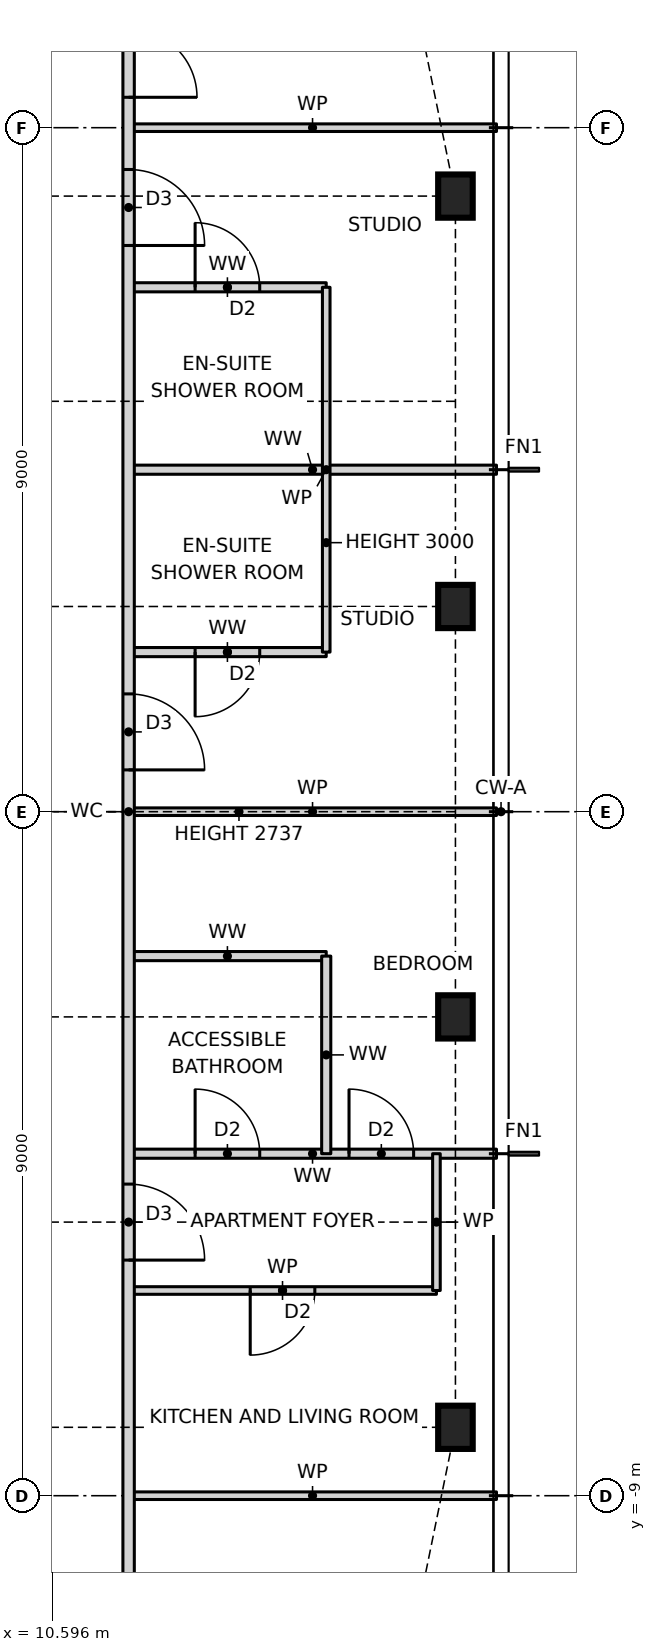
"""IFC4 building model, lengths in metres.
Left out: names, types, materials, properties, quantities, classifications, styles, units other than length and angle.
Written with IfcOpenShell. Run it as: python <this file> out.ifc"""

import sys

from ifc_helpers import new_model, si_unit, direction, frame, frame_2d, origin, origin_2d, place, context, subcontext, project, spatial, rectangle, i_section, extrude, element, fill, save


model = new_model("IFC4")
c1 = context("Model", 3, precision=1e-05, world=origin(), true_north=direction((0.0, 1.0)))
c2 = subcontext(c1, "Body", "Model", "MODEL_VIEW")
j1 = project(units=[si_unit("LENGTHUNIT", "METRE"), si_unit("PLANEANGLEUNIT", "RADIAN")], contexts=[c1])
p1 = place(None, origin())
s1 = spatial("IfcSite", under=j1, at=p1, CompositionType="ELEMENT")
p2 = place(p1, origin())
s2 = spatial("IfcBuilding", under=s1, at=p2, CompositionType="ELEMENT")
p3 = place(p2, frame((0.0, 0.0, 222.0)))
s3 = spatial("IfcBuildingStorey", under=s2, at=p3, CompositionType="ELEMENT", Elevation=222.0)
for number, where, z_axis, x_axis in (
    (1, (15.9, -8.1, 0.0), (0.0, 0.0, 1.0), (1.0, 0.0, 0.0)),
    (2, (15.9, -2.7, 0.0), (0.0, 0.0, 1.0), (1.0, 0.0, 0.0)),
    (3, (15.9, 2.7, 0.0), (0.0, 0.0, 1.0), (1.0, 0.0, 0.0)),
    (4, (15.9, 8.1, 0.0), (0.0, 0.0, 1.0), (1.0, 0.0, 0.0)),
):
    element("IfcColumn", number, at=place(p3, frame(where, z_axis=z_axis, x_axis=x_axis)), inside=s3, PredefinedType="COLUMN", context=c2, shape_type="SweptSolid", body=[
        extrude(i_section(OverallWidth=0.455, OverallDepth=0.569, WebThickness=0.078, FlangeThickness=0.125, at=origin_2d()), origin(), (0.0, 0.0, 1.0), 3.5),
    ])
p4 = place(p3, frame((11.6, -9.0, 0.0), z_axis=(0.0, 0.0, 1.0), x_axis=(1.0, 0.0, 0.0)))
e5 = element("IfcWall", 5, at=p4, inside=s3, PredefinedType="PARTITIONING", context=c2, shape_type="SweptSolid", body=[
    extrude(rectangle(XDim=4.84, YDim=0.1, at=frame_2d((2.42, 0.0))), origin(), (0.0, 0.0, 1.0), 3.27),
])
p5 = place(p3, frame((11.6, -6.3, 0.0), z_axis=(0.0, 0.0, 1.0), x_axis=(1.0, 0.0, 0.0)))
e6 = element("IfcWall", 6, at=p5, inside=s3, PredefinedType="PARTITIONING", context=c2, shape_type="SweptSolid", body=[
    extrude(rectangle(XDim=4.05, YDim=0.1, at=frame_2d((2.025, 0.0))), origin(), (0.0, 0.0, 1.0), 3.27),
])
p6 = place(p5, frame((1.6, 0.0, 0.0)))
e7 = element("IfcOpeningElement", 7, at=p6, cuts=e6, PredefinedType="OPENING", context=c2, shape_type="SweptSolid", body=[
    extrude(rectangle(XDim=0.85, YDim=2.1, at=frame_2d((0.425, 1.05))), frame((0.0, 0.06, 0.0), z_axis=(0.0, -1.0, 0.0), x_axis=(1.0, 0.0, 0.0)), (0.0, 0.0, 1.0), 0.12),
])
p7 = place(p3, frame((11.6, -4.5, 0.0), z_axis=(0.0, 0.0, 1.0), x_axis=(1.0, 0.0, 0.0)))
e8 = element("IfcWall", 8, at=p7, inside=s3, PredefinedType="PARTITIONING", context=c2, shape_type="SweptSolid", body=[
    extrude(rectangle(XDim=4.84, YDim=0.12, at=frame_2d((2.42, 0.0))), origin(), (0.0, 0.0, 1.0), 3.27),
])
p8 = place(p7, frame((2.9, 0.0, 0.0)))
e9 = element("IfcOpeningElement", 9, at=p8, cuts=e8, PredefinedType="OPENING", context=c2, shape_type="SweptSolid", body=[
    extrude(rectangle(XDim=0.85, YDim=2.1, at=frame_2d((0.425, 1.05))), frame((0.0, 0.07, 0.0), z_axis=(0.0, -1.0, 0.0), x_axis=(1.0, 0.0, 0.0)), (0.0, 0.0, 1.0), 0.14),
])
p9 = place(p7, frame((0.875, 0.0, 0.0)))
e10 = element("IfcOpeningElement", 10, at=p9, cuts=e8, PredefinedType="OPENING", context=c2, shape_type="SweptSolid", body=[
    extrude(rectangle(XDim=0.85, YDim=2.1, at=frame_2d((0.425, 1.05))), frame((0.0, 0.07, 0.0), z_axis=(0.0, -1.0, 0.0), x_axis=(1.0, 0.0, 0.0)), (0.0, 0.0, 1.0), 0.14),
])
p10 = place(p3, frame((11.6, -1.9, 0.0), z_axis=(0.0, 0.0, 1.0), x_axis=(1.0, 0.0, 0.0)))
e11 = element("IfcWall", 11, at=p10, inside=s3, PredefinedType="PARTITIONING", context=c2, shape_type="SweptSolid", body=[
    extrude(rectangle(XDim=2.6, YDim=0.12, at=frame_2d((1.3, 0.0))), origin(), (0.0, 0.0, 1.0), 3.27),
])
p11 = place(p3, frame((11.6, 0.0, 0.0), z_axis=(0.0, 0.0, 1.0), x_axis=(1.0, 0.0, 0.0)))
e12 = element("IfcWall", 12, at=p11, inside=s3, PredefinedType="PARTITIONING", context=c2, shape_type="SweptSolid", body=[
    extrude(rectangle(XDim=4.84, YDim=0.1, at=frame_2d((2.42, 0.0))), origin(), (0.0, 0.0, 1.0), 2.737),
])
p12 = place(p3, frame((11.6, 2.1, 0.0), z_axis=(0.0, 0.0, 1.0), x_axis=(1.0, 0.0, 0.0)))
e13 = element("IfcWall", 13, at=p12, inside=s3, PredefinedType="PARTITIONING", context=c2, shape_type="SweptSolid", body=[
    extrude(rectangle(XDim=2.6, YDim=0.12, at=frame_2d((1.3, 0.0))), origin(), (0.0, 0.0, 1.0), 3.27),
])
p13 = place(p12, frame((0.875, 0.0, 0.0)))
e14 = element("IfcOpeningElement", 14, at=p13, cuts=e13, PredefinedType="OPENING", context=c2, shape_type="SweptSolid", body=[
    extrude(rectangle(XDim=0.85, YDim=2.1, at=frame_2d((0.425, 1.05))), frame((0.0, 0.07, 0.0), z_axis=(0.0, -1.0, 0.0), x_axis=(1.0, 0.0, 0.0)), (0.0, 0.0, 1.0), 0.14),
])
p14 = place(p3, frame((11.6, 4.5, 0.0), z_axis=(0.0, 0.0, 1.0), x_axis=(1.0, 0.0, 0.0)))
e15 = element("IfcWall", 15, at=p14, inside=s3, PredefinedType="PARTITIONING", context=c2, shape_type="SweptSolid", body=[
    extrude(rectangle(XDim=4.84, YDim=0.12, at=frame_2d((2.42, 0.0))), origin(), (0.0, 0.0, 1.0), 3.27),
])
p15 = place(p3, frame((11.6, 6.9, 0.0), z_axis=(0.0, 0.0, 1.0), x_axis=(1.0, 0.0, 0.0)))
e16 = element("IfcWall", 16, at=p15, inside=s3, PredefinedType="PARTITIONING", context=c2, shape_type="SweptSolid", body=[
    extrude(rectangle(XDim=2.6, YDim=0.12, at=frame_2d((1.3, 0.0))), origin(), (0.0, 0.0, 1.0), 3.27),
])
p16 = place(p15, frame((0.875, 0.0, 0.0)))
e17 = element("IfcOpeningElement", 17, at=p16, cuts=e16, PredefinedType="OPENING", context=c2, shape_type="SweptSolid", body=[
    extrude(rectangle(XDim=0.85, YDim=2.1, at=frame_2d((0.425, 1.05))), frame((0.0, 0.07, 0.0), z_axis=(0.0, -1.0, 0.0), x_axis=(1.0, 0.0, 0.0)), (0.0, 0.0, 1.0), 0.14),
])
p17 = place(p3, frame((11.6, 9.0, 0.0), z_axis=(0.0, 0.0, 1.0), x_axis=(1.0, 0.0, 0.0)))
e18 = element("IfcWall", 18, at=p17, inside=s3, PredefinedType="PARTITIONING", context=c2, shape_type="SweptSolid", body=[
    extrude(rectangle(XDim=4.84, YDim=0.1, at=frame_2d((2.42, 0.0))), origin(), (0.0, 0.0, 1.0), 3.27),
])
p18 = place(p3, frame((15.65, -6.3, 0.0), z_axis=(0.0, 0.0, 1.0), x_axis=(0.0, 1.0, 0.0)))
e19 = element("IfcWall", 19, at=p18, inside=s3, PredefinedType="PARTITIONING", context=c2, shape_type="SweptSolid", body=[
    extrude(rectangle(XDim=1.8, YDim=0.1, at=frame_2d((0.9, 0.0))), origin(), (0.0, 0.0, 1.0), 3.27),
])
p19 = place(p3, frame((14.2, -4.5, 0.0), z_axis=(0.0, 0.0, 1.0), x_axis=(0.0, 1.0, 0.0)))
e20 = element("IfcWall", 20, at=p19, inside=s3, PredefinedType="PARTITIONING", context=c2, shape_type="SweptSolid", body=[
    extrude(rectangle(XDim=2.6, YDim=0.12, at=frame_2d((1.3, 0.0))), origin(), (0.0, 0.0, 1.0), 3.27),
])
p20 = place(p3, frame((14.2, 2.1, 0.0), z_axis=(0.0, 0.0, 1.0), x_axis=(0.0, 1.0, 0.0)))
e21 = element("IfcWall", 21, at=p20, inside=s3, PredefinedType="PARTITIONING", context=c2, shape_type="SweptSolid", body=[
    extrude(rectangle(XDim=4.8, YDim=0.1, at=frame_2d((2.4, 0.0))), origin(), (0.0, 0.0, 1.0), 3.0),
])
p21 = place(p3, frame((11.6, -11.6, 0.0), z_axis=(0.0, 0.0, 1.0), x_axis=(0.0, 1.0, 0.0)))
e22 = element("IfcWall", 22, at=p21, inside=s3, PredefinedType="PARTITIONING", context=c2, shape_type="SweptSolid", body=[
    extrude(rectangle(XDim=23.2, YDim=0.15, at=frame_2d((11.6, 0.0))), origin(), (0.0, 0.0, 1.0), 3.27),
])
p22 = place(p21, frame((5.7, 0.0, 0.0)))
e23 = element("IfcOpeningElement", 23, at=p22, cuts=e22, PredefinedType="OPENING", context=c2, shape_type="SweptSolid", body=[
    extrude(rectangle(XDim=1.0, YDim=2.1, at=frame_2d((0.5, 1.05))), frame((0.0, 0.085, 0.0), z_axis=(0.0, -1.0, 0.0), x_axis=(1.0, 0.0, 0.0)), (0.0, 0.0, 1.0), 0.17),
])
p23 = place(p21, frame((12.15, 0.0, 0.0)))
e24 = element("IfcOpeningElement", 24, at=p23, cuts=e22, PredefinedType="OPENING", context=c2, shape_type="SweptSolid", body=[
    extrude(rectangle(XDim=1.0, YDim=2.1, at=frame_2d((0.5, 1.05))), frame((0.0, 0.085, 0.0), z_axis=(0.0, -1.0, 0.0), x_axis=(1.0, 0.0, 0.0)), (0.0, 0.0, 1.0), 0.17),
])
p24 = place(p21, frame((19.05, 0.0, 0.0)))
e25 = element("IfcOpeningElement", 25, at=p24, cuts=e22, PredefinedType="OPENING", context=c2, shape_type="SweptSolid", body=[
    extrude(rectangle(XDim=1.0, YDim=2.1, at=frame_2d((0.5, 1.05))), frame((0.0, 0.085, 0.0), z_axis=(0.0, -1.0, 0.0), x_axis=(1.0, 0.0, 0.0)), (0.0, 0.0, 1.0), 0.17),
])
p25 = place(p21, frame((21.0, 0.0, 0.0)))
e26 = element("IfcOpeningElement", 26, at=p25, cuts=e22, PredefinedType="OPENING", context=c2, shape_type="SweptSolid", body=[
    extrude(rectangle(XDim=1.8, YDim=2.1, at=frame_2d((0.9, 1.05))), frame((0.0, 0.085, 0.0), z_axis=(0.0, -1.0, 0.0), x_axis=(1.0, 0.0, 0.0)), (0.0, 0.0, 1.0), 0.17),
])
p26 = place(p22, frame((1.0, 0.0, 0.0), z_axis=(0.0, 0.0, 1.0), x_axis=(-1.0, 0.0, 0.0)))
e27 = element("IfcDoor", 27, at=p26, inside=s3, OperationType="SINGLE_SWING_RIGHT", PredefinedType="DOOR", context=c2, shape_type="SweptSolid", body=[
    extrude(rectangle(XDim=1.0, YDim=2.1, at=frame_2d((0.5, 1.05))), frame((0.0, 0.025, 0.0), z_axis=(0.0, -1.0, 0.0), x_axis=(1.0, 0.0, 0.0)), (0.0, 0.0, 1.0), 0.05),
])
fill(e23, e27)
p27 = place(p6, frame((0.85, 0.0, 0.0), z_axis=(0.0, 0.0, 1.0), x_axis=(-1.0, 0.0, 0.0)))
e28 = element("IfcDoor", 28, at=p27, inside=s3, OperationType="SINGLE_SWING_RIGHT", PredefinedType="DOOR", context=c2, shape_type="SweptSolid", body=[
    extrude(rectangle(XDim=0.85, YDim=2.1, at=frame_2d((0.425, 1.05))), frame((0.0, 0.025, 0.0), z_axis=(0.0, -1.0, 0.0), x_axis=(1.0, 0.0, 0.0)), (0.0, 0.0, 1.0), 0.05),
])
fill(e7, e28)
p28 = place(p8, origin())
e29 = element("IfcDoor", 29, at=p28, inside=s3, OperationType="SINGLE_SWING_LEFT", PredefinedType="DOOR", context=c2, shape_type="SweptSolid", body=[
    extrude(rectangle(XDim=0.85, YDim=2.1, at=frame_2d((0.425, 1.05))), frame((0.0, 0.025, 0.0), z_axis=(0.0, -1.0, 0.0), x_axis=(1.0, 0.0, 0.0)), (0.0, 0.0, 1.0), 0.05),
])
fill(e9, e29)
p29 = place(p9, origin())
e30 = element("IfcDoor", 30, at=p29, inside=s3, OperationType="SINGLE_SWING_LEFT", PredefinedType="DOOR", context=c2, shape_type="SweptSolid", body=[
    extrude(rectangle(XDim=0.85, YDim=2.1, at=frame_2d((0.425, 1.05))), frame((0.0, 0.025, 0.0), z_axis=(0.0, -1.0, 0.0), x_axis=(1.0, 0.0, 0.0)), (0.0, 0.0, 1.0), 0.05),
])
fill(e10, e30)
p30 = place(p23, frame((1.0, 0.0, 0.0), z_axis=(0.0, 0.0, 1.0), x_axis=(-1.0, 0.0, 0.0)))
e31 = element("IfcDoor", 31, at=p30, inside=s3, OperationType="SINGLE_SWING_RIGHT", PredefinedType="DOOR", context=c2, shape_type="SweptSolid", body=[
    extrude(rectangle(XDim=1.0, YDim=2.1, at=frame_2d((0.5, 1.05))), frame((0.0, 0.025, 0.0), z_axis=(0.0, -1.0, 0.0), x_axis=(1.0, 0.0, 0.0)), (0.0, 0.0, 1.0), 0.05),
])
fill(e24, e31)
p31 = place(p13, frame((0.85, 0.0, 0.0), z_axis=(0.0, 0.0, 1.0), x_axis=(-1.0, 0.0, 0.0)))
e32 = element("IfcDoor", 32, at=p31, inside=s3, OperationType="SINGLE_SWING_RIGHT", PredefinedType="DOOR", context=c2, shape_type="SweptSolid", body=[
    extrude(rectangle(XDim=0.85, YDim=2.1, at=frame_2d((0.425, 1.05))), frame((0.0, 0.025, 0.0), z_axis=(0.0, -1.0, 0.0), x_axis=(1.0, 0.0, 0.0)), (0.0, 0.0, 1.0), 0.05),
])
fill(e14, e32)
p32 = place(p24, frame((1.0, 0.0, 0.0), z_axis=(0.0, 0.0, 1.0), x_axis=(-1.0, 0.0, 0.0)))
e33 = element("IfcDoor", 33, at=p32, inside=s3, OperationType="SINGLE_SWING_RIGHT", PredefinedType="DOOR", context=c2, shape_type="SweptSolid", body=[
    extrude(rectangle(XDim=1.0, YDim=2.1, at=frame_2d((0.5, 1.05))), frame((0.0, 0.025, 0.0), z_axis=(0.0, -1.0, 0.0), x_axis=(1.0, 0.0, 0.0)), (0.0, 0.0, 1.0), 0.05),
])
fill(e25, e33)
p33 = place(p16, origin())
e34 = element("IfcDoor", 34, at=p33, inside=s3, OperationType="SINGLE_SWING_LEFT", PredefinedType="DOOR", context=c2, shape_type="SweptSolid", body=[
    extrude(rectangle(XDim=0.85, YDim=2.1, at=frame_2d((0.425, 1.05))), frame((0.0, 0.025, 0.0), z_axis=(0.0, -1.0, 0.0), x_axis=(1.0, 0.0, 0.0)), (0.0, 0.0, 1.0), 0.05),
])
fill(e17, e34)
p34 = place(p25, frame((1.8, 0.0, 0.0), z_axis=(0.0, 0.0, 1.0), x_axis=(-1.0, 0.0, 0.0)))
e35 = element("IfcDoor", 35, at=p34, inside=s3, OperationType="DOUBLE_DOOR_SINGLE_SWING", PredefinedType="DOOR", context=c2, shape_type="SweptSolid", body=[
    extrude(rectangle(XDim=1.8, YDim=2.1, at=frame_2d((0.9, 1.05))), frame((0.0, 0.025, 0.0), z_axis=(0.0, -1.0, 0.0), x_axis=(1.0, 0.0, 0.0)), (0.0, 0.0, 1.0), 0.05),
])
fill(e26, e35)
save(model, sys.argv[1])
